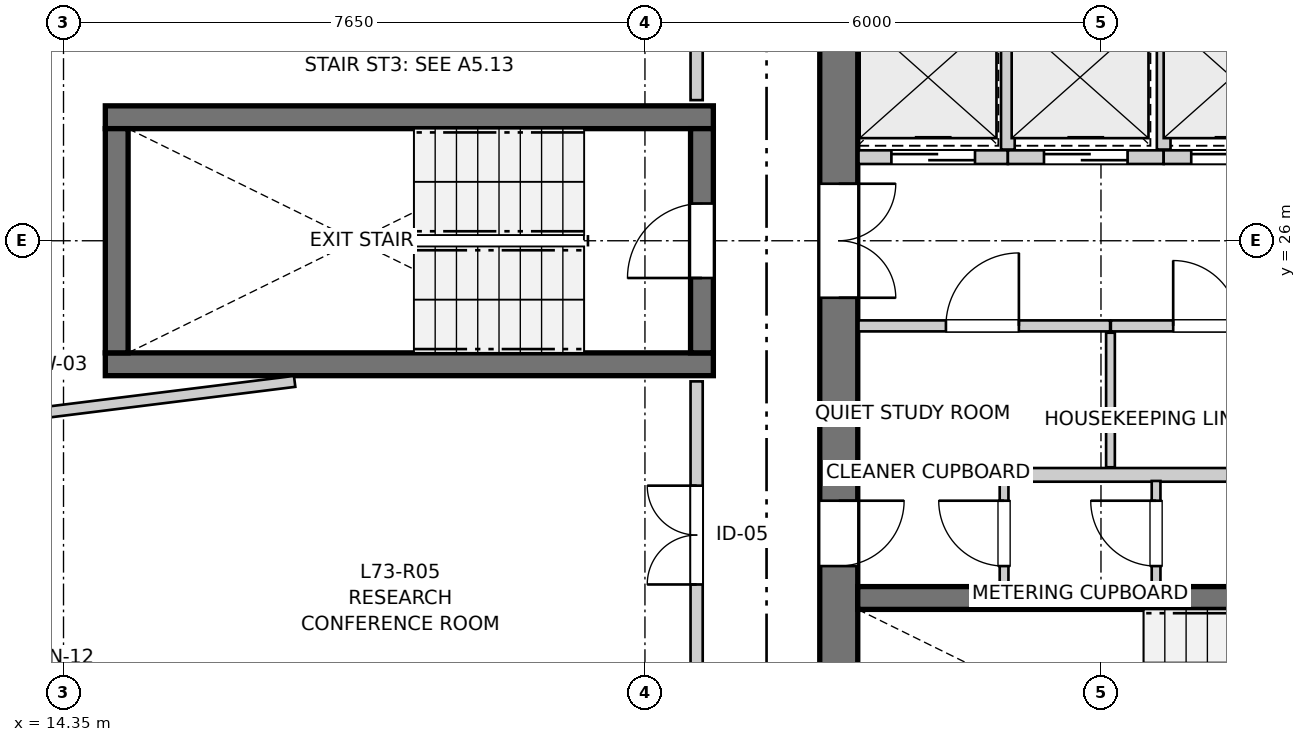
"""IFC4 building model, lengths in metres.
Left out: names, types, materials, properties, quantities, classifications, styles, units other than length and angle.
Written with IfcOpenShell. Run it as: python <this file> out.ifc"""

import sys

from ifc_helpers import new_model, si_unit, direction, frame, frame_2d, origin, place, context, subcontext, project, spatial, rectangle, extrude, source, transform, mapped, element, fill, save


model = new_model("IFC4")
c1 = context("Model", 3, precision=1e-05, world=origin(), true_north=direction((0.0, 1.0)))
c2 = subcontext(c1, "Body", "Model", "MODEL_VIEW")
j1 = project(units=[si_unit("LENGTHUNIT", "METRE"), si_unit("PLANEANGLEUNIT", "RADIAN")], contexts=[c1])
p1 = place(None, origin())
s1 = spatial("IfcSite", under=j1, at=p1, CompositionType="ELEMENT")
p2 = place(p1, origin())
s2 = spatial("IfcBuilding", under=s1, at=p2, CompositionType="ELEMENT")
p3 = place(p2, frame((0.0, 0.0, 243.6)))
s3 = spatial("IfcBuildingStorey", under=s2, at=p3, CompositionType="ELEMENT", Elevation=243.6)
p4 = place(p3, frame((24.55, 33.8, 0.0), z_axis=(0.0, 0.0, 1.0), x_axis=(0.0, -1.0, 0.0)))
e1 = element("IfcWall", 1, at=p4, inside=s3, PredefinedType="SHEAR", context=c2, shape_type="SweptSolid", body=[
    extrude(rectangle(XDim=15.6, YDim=0.5, at=frame_2d((7.8, 0.0))), origin(), (0.0, 0.0, 1.0), 2.96),
])
p5 = place(p4, frame((7.05, 0.0, 0.0)))
e2 = element("IfcOpeningElement", 2, at=p5, cuts=e1, PredefinedType="OPENING", context=c2, shape_type="SweptSolid", body=[
    extrude(rectangle(XDim=1.5, YDim=2.15, at=frame_2d((0.75, 1.075))), frame((0.0, 0.26, 0.0), z_axis=(0.0, -1.0, 0.0), x_axis=(1.0, 0.0, 0.0)), (0.0, 0.0, 1.0), 0.52),
])
p6 = place(p4, frame((3.52, 0.0, 0.0)))
e3 = element("IfcOpeningElement", 3, at=p6, cuts=e1, PredefinedType="OPENING", context=c2, shape_type="SweptSolid", body=[
    extrude(rectangle(XDim=0.86, YDim=2.05, at=frame_2d((0.43, 1.025))), frame((0.0, 0.26, 0.0), z_axis=(0.0, -1.0, 0.0), x_axis=(1.0, 0.0, 0.0)), (0.0, 0.0, 1.0), 0.52),
])
p7 = place(p4, frame((11.22, 0.0, 0.0)))
e4 = element("IfcOpeningElement", 4, at=p7, cuts=e1, PredefinedType="OPENING", context=c2, shape_type="SweptSolid", body=[
    extrude(rectangle(XDim=0.86, YDim=2.05, at=frame_2d((0.43, 1.025))), frame((0.0, 0.26, 0.0), z_axis=(0.0, -1.0, 0.0), x_axis=(1.0, 0.0, 0.0)), (0.0, 0.0, 1.0), 0.52),
])
p8 = place(p3, frame((24.8, 21.3, 0.0), z_axis=(0.0, 0.0, 1.0), x_axis=(1.0, 0.0, 0.0)))
e5 = element("IfcWall", 5, at=p8, inside=s3, PredefinedType="SHEAR", context=c2, shape_type="SweptSolid", body=[
    extrude(rectangle(XDim=11.1, YDim=0.3, at=frame_2d((5.55, 0.0))), origin(), (0.0, 0.0, 1.0), 2.96),
])
p9 = place(p8, frame((6.22, 0.0, 0.0)))
e6 = element("IfcOpeningElement", 6, at=p9, cuts=e5, PredefinedType="OPENING", context=c2, shape_type="SweptSolid", body=[
    extrude(rectangle(XDim=0.98, YDim=2.15, at=frame_2d((0.49, 1.075))), frame((0.0, 0.16, 0.0), z_axis=(0.0, -1.0, 0.0), x_axis=(1.0, 0.0, 0.0)), (0.0, 0.0, 1.0), 0.32),
])
p10 = place(p8, frame((9.15, 0.0, 0.0)))
e7 = element("IfcOpeningElement", 7, at=p10, cuts=e5, PredefinedType="OPENING", context=c2, shape_type="SweptSolid", body=[
    extrude(rectangle(XDim=1.15, YDim=2.15, at=frame_2d((0.575, 1.075))), frame((0.0, 0.16, 0.0), z_axis=(0.0, -1.0, 0.0), x_axis=(1.0, 0.0, 0.0)), (0.0, 0.0, 1.0), 0.32),
])
for number, where, z_axis, x_axis in (
    (8, (14.9, 24.375, 0.0), (0.0, 0.0, 1.0), (1.0, 0.0, 0.0)),
    (9, (22.9, 27.625, 0.0), (0.0, 0.0, 1.0), (-1.0, 0.0, 0.0)),
):
    element("IfcWall", number, at=place(p3, frame(where, z_axis=z_axis, x_axis=x_axis)), inside=s3, PredefinedType="SHEAR", context=c2, shape_type="SweptSolid", body=[
        extrude(rectangle(XDim=8.0, YDim=0.3, at=frame_2d((4.0, 0.0))), origin(), (0.0, 0.0, 1.0), 2.96),
    ])
p11 = place(p3, frame((15.05, 27.475, 0.0), z_axis=(0.0, 0.0, 1.0), x_axis=(0.0, -1.0, 0.0)))
e10 = element("IfcWall", 10, at=p11, inside=s3, PredefinedType="SHEAR", context=c2, shape_type="SweptSolid", body=[
    extrude(rectangle(XDim=2.95, YDim=0.3, at=frame_2d((1.475, 0.0))), origin(), (0.0, 0.0, 1.0), 2.96),
])
p12 = place(p3, frame((22.75, 24.525, 0.0), z_axis=(0.0, 0.0, 1.0), x_axis=(0.0, 1.0, 0.0)))
e11 = element("IfcWall", 11, at=p12, inside=s3, PredefinedType="SHEAR", context=c2, shape_type="SweptSolid", body=[
    extrude(rectangle(XDim=2.95, YDim=0.3, at=frame_2d((1.475, 0.0))), origin(), (0.0, 0.0, 1.0), 2.96),
])
p13 = place(p12, frame((0.985, 0.0, 0.0)))
e12 = element("IfcOpeningElement", 12, at=p13, cuts=e11, PredefinedType="OPENING", context=c2, shape_type="SweptSolid", body=[
    extrude(rectangle(XDim=0.98, YDim=2.15, at=frame_2d((0.49, 1.075))), frame((0.0, 0.16, 0.0), z_axis=(0.0, -1.0, 0.0), x_axis=(1.0, 0.0, 0.0)), (0.0, 0.0, 1.0), 0.32),
])
p14 = place(p3, frame((13.299, 21.067, 0.0), z_axis=(0.0, 0.0, 1.0), x_axis=(0.657609731914, -0.753358772759, 0.0)))
e13 = element("IfcWall", 13, at=p14, inside=s3, PredefinedType="SOLIDWALL", context=c2, shape_type="SweptSolid", body=[
    extrude(rectangle(XDim=2.203, YDim=0.32, at=frame_2d((1.102, 0.0))), origin(), (0.0, 0.0, 1.0), 2.58),
])
p15 = place(p14, frame((0.616, 0.0, 0.82)))
e14 = element("IfcOpeningElement", 14, at=p15, cuts=e13, PredefinedType="OPENING", context=c2, shape_type="SweptSolid", body=[
    extrude(rectangle(XDim=0.95, YDim=1.35, at=frame_2d((0.475, 0.675))), frame((0.0, 0.17, 0.0), z_axis=(0.0, -1.0, 0.0), x_axis=(1.0, 0.0, 0.0)), (0.0, 0.0, 1.0), 0.34),
])
p16 = place(p3, frame((24.81, 22.92, 0.0), z_axis=(0.0, 0.0, 1.0), x_axis=(1.0, 0.0, 0.0)))
e15 = element("IfcWall", 15, at=p16, inside=s3, PredefinedType="PARTITIONING", context=c2, shape_type="SweptSolid", body=[
    extrude(rectangle(XDim=5.84, YDim=0.18, at=frame_2d((2.92, 0.0))), origin(), (0.0, 0.0, 1.0), 2.96),
])
p17 = place(p3, frame((24.81, 24.88, 0.0), z_axis=(0.0, 0.0, 1.0), x_axis=(1.0, 0.0, 0.0)))
e16 = element("IfcWall", 16, at=p17, inside=s3, PredefinedType="PARTITIONING", context=c2, shape_type="SweptSolid", body=[
    extrude(rectangle(XDim=3.31, YDim=0.145, at=frame_2d((1.655, 0.0))), origin(), (0.0, 0.0, 1.0), 2.96),
])
p18 = place(p17, frame((1.15, 0.0, 0.0)))
e17 = element("IfcOpeningElement", 17, at=p18, cuts=e16, PredefinedType="OPENING", context=c2, shape_type="SweptSolid", body=[
    extrude(rectangle(XDim=0.96, YDim=2.1, at=frame_2d((0.48, 1.05))), frame((0.0, 0.083, 0.0), z_axis=(0.0, -1.0, 0.0), x_axis=(1.0, 0.0, 0.0)), (0.0, 0.0, 1.0), 0.165),
])
p19 = place(p3, frame((28.13, 24.88, 0.0), z_axis=(0.0, 0.0, 1.0), x_axis=(1.0, 0.0, 0.0)))
e18 = element("IfcWall", 18, at=p19, inside=s3, PredefinedType="PARTITIONING", context=c2, shape_type="SweptSolid", body=[
    extrude(rectangle(XDim=2.52, YDim=0.145, at=frame_2d((1.26, 0.0))), origin(), (0.0, 0.0, 1.0), 2.96),
])
p20 = place(p19, frame((0.82, 0.0, 0.0)))
e19 = element("IfcOpeningElement", 19, at=p20, cuts=e18, PredefinedType="OPENING", context=c2, shape_type="SweptSolid", body=[
    extrude(rectangle(XDim=0.86, YDim=2.05, at=frame_2d((0.43, 1.025))), frame((0.0, 0.083, 0.0), z_axis=(0.0, -1.0, 0.0), x_axis=(1.0, 0.0, 0.0)), (0.0, 0.0, 1.0), 0.165),
])
p21 = place(p3, frame((28.125, 23.02, 0.0), z_axis=(0.0, 0.0, 1.0), x_axis=(0.0, 1.0, 0.0)))
e20 = element("IfcWall", 20, at=p21, inside=s3, PredefinedType="PARTITIONING", context=c2, shape_type="SweptSolid", body=[
    extrude(rectangle(XDim=1.77, YDim=0.115, at=frame_2d((0.885, 0.0))), origin(), (0.0, 0.0, 1.0), 2.96),
])
p22 = place(p3, frame((24.81, 27.1, 0.0), z_axis=(0.0, 0.0, 1.0), x_axis=(1.0, 0.0, 0.0)))
e21 = element("IfcWall", 21, at=p22, inside=s3, PredefinedType="PARTITIONING", context=c2, shape_type="SweptSolid", body=[
    extrude(rectangle(XDim=1.965, YDim=0.18, at=frame_2d((0.982, 0.0))), origin(), (0.0, 0.0, 1.0), 2.96),
])
p23 = place(p22, frame((0.433, 0.0, 0.0)))
e22 = element("IfcOpeningElement", 22, at=p23, cuts=e21, PredefinedType="OPENING", context=c2, shape_type="SweptSolid", body=[
    extrude(rectangle(XDim=1.1, YDim=2.15, at=frame_2d((0.55, 1.075))), frame((0.0, 0.1, 0.0), z_axis=(0.0, -1.0, 0.0), x_axis=(1.0, 0.0, 0.0)), (0.0, 0.0, 1.0), 0.2),
])
p24 = place(p3, frame((26.775, 27.1, 0.0), z_axis=(0.0, 0.0, 1.0), x_axis=(1.0, 0.0, 0.0)))
e23 = element("IfcWall", 23, at=p24, inside=s3, PredefinedType="PARTITIONING", context=c2, shape_type="SweptSolid", body=[
    extrude(rectangle(XDim=2.05, YDim=0.18, at=frame_2d((1.025, 0.0))), origin(), (0.0, 0.0, 1.0), 2.96),
])
p25 = place(p24, frame((0.475, 0.0, 0.0)))
e24 = element("IfcOpeningElement", 24, at=p25, cuts=e23, PredefinedType="OPENING", context=c2, shape_type="SweptSolid", body=[
    extrude(rectangle(XDim=1.1, YDim=2.15, at=frame_2d((0.55, 1.075))), frame((0.0, 0.1, 0.0), z_axis=(0.0, -1.0, 0.0), x_axis=(1.0, 0.0, 0.0)), (0.0, 0.0, 1.0), 0.2),
])
p26 = place(p3, frame((26.775, 27.2, 0.0), z_axis=(0.0, 0.0, 1.0), x_axis=(0.0, 1.0, 0.0)))
e25 = element("IfcWall", 25, at=p26, inside=s3, PredefinedType="PARTITIONING", context=c2, shape_type="SweptSolid", body=[
    extrude(rectangle(XDim=1.78, YDim=0.18, at=frame_2d((0.89, 0.0))), origin(), (0.0, 0.0, 1.0), 2.96),
])
p27 = place(p3, frame((28.825, 27.1, 0.0), z_axis=(0.0, 0.0, 1.0), x_axis=(1.0, 0.0, 0.0)))
e26 = element("IfcWall", 26, at=p27, inside=s3, PredefinedType="PARTITIONING", context=c2, shape_type="SweptSolid", body=[
    extrude(rectangle(XDim=1.825, YDim=0.18, at=frame_2d((0.913, 0.0))), origin(), (0.0, 0.0, 1.0), 2.96),
])
p28 = place(p27, frame((0.363, 0.0, 0.0)))
e27 = element("IfcOpeningElement", 27, at=p28, cuts=e26, PredefinedType="OPENING", context=c2, shape_type="SweptSolid", body=[
    extrude(rectangle(XDim=1.1, YDim=2.15, at=frame_2d((0.55, 1.075))), frame((0.0, 0.1, 0.0), z_axis=(0.0, -1.0, 0.0), x_axis=(1.0, 0.0, 0.0)), (0.0, 0.0, 1.0), 0.2),
])
p29 = place(p3, frame((28.825, 27.2, 0.0), z_axis=(0.0, 0.0, 1.0), x_axis=(0.0, 1.0, 0.0)))
e28 = element("IfcWall", 28, at=p29, inside=s3, PredefinedType="PARTITIONING", context=c2, shape_type="SweptSolid", body=[
    extrude(rectangle(XDim=1.78, YDim=0.18, at=frame_2d((0.89, 0.0))), origin(), (0.0, 0.0, 1.0), 2.96),
])
p30 = place(p3, frame((26.725, 21.46, 0.0), z_axis=(0.0, 0.0, 1.0), x_axis=(0.0, 1.0, 0.0)))
e29 = element("IfcWall", 29, at=p30, inside=s3, PredefinedType="PARTITIONING", context=c2, shape_type="SweptSolid", body=[
    extrude(rectangle(XDim=1.38, YDim=0.115, at=frame_2d((0.69, 0.0))), origin(), (0.0, 0.0, 1.0), 2.96),
])
p31 = place(p30, frame((0.26, 0.0, 0.0)))
e30 = element("IfcOpeningElement", 30, at=p31, cuts=e29, PredefinedType="OPENING", context=c2, shape_type="SweptSolid", body=[
    extrude(rectangle(XDim=0.86, YDim=2.05, at=frame_2d((0.43, 1.025))), frame((0.0, 0.067, 0.0), z_axis=(0.0, -1.0, 0.0), x_axis=(1.0, 0.0, 0.0)), (0.0, 0.0, 1.0), 0.135),
])
p32 = place(p3, frame((28.725, 21.46, 0.0), z_axis=(0.0, 0.0, 1.0), x_axis=(0.0, 1.0, 0.0)))
e31 = element("IfcWall", 31, at=p32, inside=s3, PredefinedType="PARTITIONING", context=c2, shape_type="SweptSolid", body=[
    extrude(rectangle(XDim=1.38, YDim=0.115, at=frame_2d((0.69, 0.0))), origin(), (0.0, 0.0, 1.0), 2.96),
])
p33 = place(p32, frame((0.26, 0.0, 0.0)))
e32 = element("IfcOpeningElement", 32, at=p33, cuts=e31, PredefinedType="OPENING", context=c2, shape_type="SweptSolid", body=[
    extrude(rectangle(XDim=0.86, YDim=2.05, at=frame_2d((0.43, 1.025))), frame((0.0, 0.067, 0.0), z_axis=(0.0, -1.0, 0.0), x_axis=(1.0, 0.0, 0.0)), (0.0, 0.0, 1.0), 0.135),
])
p34 = place(p3, frame((22.68, 27.85, 0.0), z_axis=(0.0, 0.0, 1.0), x_axis=(0.0, 1.0, 0.0)))
e33 = element("IfcWall", 33, at=p34, inside=s3, PredefinedType="PARTITIONING", context=c2, shape_type="SweptSolid", body=[
    extrude(rectangle(XDim=4.377, YDim=0.16, at=frame_2d((2.188, 0.0))), origin(), (0.0, 0.0, 1.0), 2.96),
])
p35 = place(p34, frame((1.559, 0.0, 0.0)))
e34 = element("IfcOpeningElement", 34, at=p35, cuts=e33, PredefinedType="OPENING", context=c2, shape_type="SweptSolid", body=[
    extrude(rectangle(XDim=1.3, YDim=2.1, at=frame_2d((0.65, 1.05))), frame((0.0, 0.09, 0.0), z_axis=(0.0, -1.0, 0.0), x_axis=(1.0, 0.0, 0.0)), (0.0, 0.0, 1.0), 0.18),
])
p36 = place(p3, frame((22.68, 20.012, 0.0), z_axis=(0.0, 0.0, 1.0), x_axis=(0.0, 1.0, 0.0)))
e35 = element("IfcWall", 35, at=p36, inside=s3, PredefinedType="PARTITIONING", context=c2, shape_type="SweptSolid", body=[
    extrude(rectangle(XDim=4.138, YDim=0.16, at=frame_2d((2.069, 0.0))), origin(), (0.0, 0.0, 1.0), 2.96),
])
p37 = place(p36, frame((1.466, 0.0, 0.0)))
e36 = element("IfcOpeningElement", 36, at=p37, cuts=e35, PredefinedType="OPENING", context=c2, shape_type="SweptSolid", body=[
    extrude(rectangle(XDim=1.3, YDim=2.1, at=frame_2d((0.65, 1.05))), frame((0.0, 0.09, 0.0), z_axis=(0.0, -1.0, 0.0), x_axis=(1.0, 0.0, 0.0)), (0.0, 0.0, 1.0), 0.18),
])
p38 = place(p3, frame((11.354, 23.398, 0.0), z_axis=(0.0, 0.0, 1.0), x_axis=(0.992337032495, 0.123560567901, 0.0)))
e37 = element("IfcWall", 37, at=p38, inside=s3, PredefinedType="PARTITIONING", context=c2, shape_type="SweptSolid", body=[
    extrude(rectangle(XDim=6.084, YDim=0.145, at=frame_2d((3.042, 0.0))), origin(), (0.0, 0.0, 1.0), 2.96),
])
m1 = source(origin(), c2, "Body", "SweptSolid", [
    extrude(rectangle(XDim=0.95, YDim=1.35, at=frame_2d((0.475, 0.675))), frame((0.0, 0.03, 0.0), z_axis=(0.0, -1.0, 0.0), x_axis=(1.0, 0.0, 0.0)), (0.0, 0.0, 1.0), 0.06),
])
p39 = place(p15, origin())
e38 = element("IfcWindow", 38, at=p39, inside=s3, PartitioningType="SINGLE_PANEL", PredefinedType="WINDOW", context=c2, shape_type="MappedRepresentation", body=[
    mapped(m1, transform((0.0, 0.0, 0.0), x_axis=(1.0, 0.0, 0.0), y_axis=(0.0, 1.0, 0.0), z_axis=(0.0, 0.0, 1.0), scale=1.0)),
])
fill(e14, e38)
m2 = source(origin(), c2, "Body", "SweptSolid", [
    extrude(rectangle(XDim=0.98, YDim=2.15, at=frame_2d((0.49, 1.075))), frame((0.0, 0.025, 0.0), z_axis=(0.0, -1.0, 0.0), x_axis=(1.0, 0.0, 0.0)), (0.0, 0.0, 1.0), 0.05),
])
p40 = place(p13, origin())
e39 = element("IfcDoor", 39, at=p40, inside=s3, OperationType="SINGLE_SWING_LEFT", PredefinedType="DOOR", context=c2, shape_type="MappedRepresentation", body=[
    mapped(m2, transform((0.0, 0.0, 0.0), x_axis=(1.0, 0.0, 0.0), y_axis=(0.0, 1.0, 0.0), z_axis=(0.0, 0.0, 1.0), scale=1.0)),
])
fill(e12, e39)
m3 = source(origin(), c2, "Body", "SweptSolid", [
    extrude(rectangle(XDim=1.5, YDim=2.15, at=frame_2d((0.75, 1.075))), frame((0.0, 0.025, 0.0), z_axis=(0.0, -1.0, 0.0), x_axis=(1.0, 0.0, 0.0)), (0.0, 0.0, 1.0), 0.05),
])
p41 = place(p5, origin())
e40 = element("IfcDoor", 40, at=p41, inside=s3, OperationType="DOUBLE_DOOR_SINGLE_SWING", PredefinedType="DOOR", context=c2, shape_type="MappedRepresentation", body=[
    mapped(m3, transform((0.0, 0.0, 0.0), x_axis=(1.0, 0.0, 0.0), y_axis=(0.0, 1.0, 0.0), z_axis=(0.0, 0.0, 1.0), scale=1.0)),
])
fill(e2, e40)
m4 = source(origin(), c2, "Body", "SweptSolid", [
    extrude(rectangle(XDim=0.86, YDim=2.05, at=frame_2d((0.43, 1.025))), frame((0.0, 0.025, 0.0), z_axis=(0.0, -1.0, 0.0), x_axis=(1.0, 0.0, 0.0)), (0.0, 0.0, 1.0), 0.05),
])
p42 = place(p7, origin())
e41 = element("IfcDoor", 41, at=p42, inside=s3, OperationType="SINGLE_SWING_LEFT", PredefinedType="DOOR", context=c2, shape_type="MappedRepresentation", body=[
    mapped(m4, transform((0.0, 0.0, 0.0), x_axis=(1.0, 0.0, 0.0), y_axis=(0.0, 1.0, 0.0), z_axis=(0.0, 0.0, 1.0), scale=1.0)),
])
fill(e4, e41)
m5 = source(origin(), c2, "Body", "SweptSolid", [
    extrude(rectangle(XDim=0.96, YDim=2.1, at=frame_2d((0.48, 1.05))), frame((0.0, 0.025, 0.0), z_axis=(0.0, -1.0, 0.0), x_axis=(1.0, 0.0, 0.0)), (0.0, 0.0, 1.0), 0.05),
])
p43 = place(p18, origin())
e42 = element("IfcDoor", 42, at=p43, inside=s3, OperationType="SINGLE_SWING_RIGHT", PredefinedType="DOOR", context=c2, shape_type="MappedRepresentation", body=[
    mapped(m5, transform((0.0, 0.0, 0.0), x_axis=(1.0, 0.0, 0.0), y_axis=(0.0, 1.0, 0.0), z_axis=(0.0, 0.0, 1.0), scale=1.0)),
])
fill(e17, e42)
p44 = place(p20, origin())
e43 = element("IfcDoor", 43, at=p44, inside=s3, OperationType="SINGLE_SWING_LEFT", PredefinedType="DOOR", context=c2, shape_type="MappedRepresentation", body=[
    mapped(m4, transform((0.0, 0.0, 0.0), x_axis=(1.0, 0.0, 0.0), y_axis=(0.0, 1.0, 0.0), z_axis=(0.0, 0.0, 1.0), scale=1.0)),
])
fill(e19, e43)
m6 = source(origin(), c2, "Body", "SweptSolid", [
    extrude(rectangle(XDim=1.1, YDim=2.15, at=frame_2d((0.55, 1.075))), frame((0.0, 0.025, 0.0), z_axis=(0.0, -1.0, 0.0), x_axis=(1.0, 0.0, 0.0)), (0.0, 0.0, 1.0), 0.05),
])
p45 = place(p23, origin())
e44 = element("IfcDoor", 44, at=p45, inside=s3, OperationType="DOUBLE_DOOR_SLIDING", PredefinedType="DOOR", context=c2, shape_type="MappedRepresentation", body=[
    mapped(m6, transform((0.0, 0.0, 0.0), x_axis=(1.0, 0.0, 0.0), y_axis=(0.0, 1.0, 0.0), z_axis=(0.0, 0.0, 1.0), scale=1.0)),
])
fill(e22, e44)
p46 = place(p25, origin())
e45 = element("IfcDoor", 45, at=p46, inside=s3, OperationType="DOUBLE_DOOR_SLIDING", PredefinedType="DOOR", context=c2, shape_type="MappedRepresentation", body=[
    mapped(m6, transform((0.0, 0.0, 0.0), x_axis=(1.0, 0.0, 0.0), y_axis=(0.0, 1.0, 0.0), z_axis=(0.0, 0.0, 1.0), scale=1.0)),
])
fill(e24, e45)
p47 = place(p28, origin())
e46 = element("IfcDoor", 46, at=p47, inside=s3, OperationType="DOUBLE_DOOR_SLIDING", PredefinedType="DOOR", context=c2, shape_type="MappedRepresentation", body=[
    mapped(m6, transform((0.0, 0.0, 0.0), x_axis=(1.0, 0.0, 0.0), y_axis=(0.0, 1.0, 0.0), z_axis=(0.0, 0.0, 1.0), scale=1.0)),
])
fill(e27, e46)
p48 = place(p31, origin())
e47 = element("IfcDoor", 47, at=p48, inside=s3, OperationType="SINGLE_SWING_RIGHT", PredefinedType="DOOR", context=c2, shape_type="MappedRepresentation", body=[
    mapped(m4, transform((0.0, 0.0, 0.0), x_axis=(1.0, 0.0, 0.0), y_axis=(0.0, 1.0, 0.0), z_axis=(0.0, 0.0, 1.0), scale=1.0)),
])
fill(e30, e47)
p49 = place(p33, origin())
e48 = element("IfcDoor", 48, at=p49, inside=s3, OperationType="SINGLE_SWING_RIGHT", PredefinedType="DOOR", context=c2, shape_type="MappedRepresentation", body=[
    mapped(m4, transform((0.0, 0.0, 0.0), x_axis=(1.0, 0.0, 0.0), y_axis=(0.0, 1.0, 0.0), z_axis=(0.0, 0.0, 1.0), scale=1.0)),
])
fill(e32, e48)
m7 = source(origin(), c2, "Body", "SweptSolid", [
    extrude(rectangle(XDim=1.3, YDim=2.1, at=frame_2d((0.65, 1.05))), frame((0.0, 0.025, 0.0), z_axis=(0.0, -1.0, 0.0), x_axis=(1.0, 0.0, 0.0)), (0.0, 0.0, 1.0), 0.05),
])
p50 = place(p37, origin())
e49 = element("IfcDoor", 49, at=p50, inside=s3, OperationType="DOUBLE_DOOR_SINGLE_SWING", PredefinedType="DOOR", context=c2, shape_type="MappedRepresentation", body=[
    mapped(m7, transform((0.0, 0.0, 0.0), x_axis=(1.0, 0.0, 0.0), y_axis=(0.0, 1.0, 0.0), z_axis=(0.0, 0.0, 1.0), scale=1.0)),
])
fill(e36, e49)
save(model, sys.argv[1])
